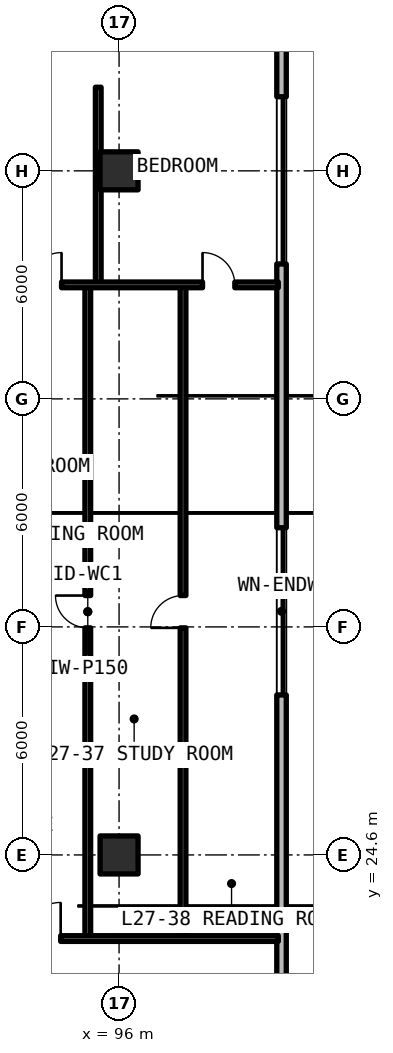
"""IFC4 building model, lengths in metres.
Left out: names, types, materials, properties, quantities, classifications, styles, units other than length and angle.
Written with IfcOpenShell. Run it as: python <this file> out.ifc"""

import sys

from ifc_helpers import new_model, si_unit, direction, frame, frame_2d, origin, origin_2d, place, context, subcontext, project, spatial, rectangle, extrude, element, fill, save


model = new_model("IFC4")
c1 = context("Model", 3, precision=1e-05, world=origin(), true_north=direction((0.0, 1.0)))
c2 = subcontext(c1, "Body", "Model", "MODEL_VIEW")
j1 = project(units=[si_unit("LENGTHUNIT", "METRE"), si_unit("PLANEANGLEUNIT", "RADIAN")], contexts=[c1])
p1 = place(None, origin())
s1 = spatial("IfcSite", under=j1, at=p1, CompositionType="ELEMENT")
p2 = place(p1, origin())
s2 = spatial("IfcBuilding", under=s1, at=p2, CompositionType="ELEMENT")
p3 = place(p2, frame((0.0, 0.0, 98.67)))
s3 = spatial("IfcBuildingStorey", under=s2, at=p3, CompositionType="ELEMENT", Elevation=98.67)
for number, where, z_axis, x_axis in (
    (1, (96.0, 24.6, 0.0), (0.0, 0.0, 1.0), (1.0, 0.0, 0.0)),
    (2, (96.0, 42.6, 0.0), (0.0, 0.0, 1.0), (1.0, 0.0, 0.0)),
):
    element("IfcColumn", number, at=place(p3, frame(where, z_axis=z_axis, x_axis=x_axis)), inside=s3, PredefinedType="COLUMN", context=c2, shape_type="SweptSolid", body=[
        extrude(rectangle(XDim=1.0, YDim=1.0, at=origin_2d()), origin(), (0.0, 0.0, 1.0), 3.3),
    ])
p4 = place(p3, frame((100.275, 13.852, 0.0), z_axis=(0.0, 0.0, 1.0), x_axis=(0.0, 1.0, 0.0)))
e3 = element("IfcWall", 3, at=p4, inside=s3, PredefinedType="SOLIDWALL", context=c2, shape_type="SweptSolid", body=[
    extrude(rectangle(XDim=39.496, YDim=0.25, at=frame_2d((19.748, 0.0))), origin(), (0.0, 0.0, 1.0), 3.08),
])
p5 = place(p4, frame((14.958, 0.0, 0.78)))
e4 = element("IfcOpeningElement", 4, at=p5, cuts=e3, PredefinedType="OPENING", context=c2, shape_type="SweptSolid", body=[
    extrude(rectangle(XDim=4.4, YDim=1.66, at=frame_2d((2.2, 0.83))), frame((0.0, 0.135, 0.0), z_axis=(0.0, -1.0, 0.0), x_axis=(1.0, 0.0, 0.0)), (0.0, 0.0, 1.0), 0.27),
])
p6 = place(p4, frame((26.298, 0.0, 0.78)))
e5 = element("IfcOpeningElement", 5, at=p6, cuts=e3, PredefinedType="OPENING", context=c2, shape_type="SweptSolid", body=[
    extrude(rectangle(XDim=4.4, YDim=1.66, at=frame_2d((2.2, 0.83))), frame((0.0, 0.135, 0.0), z_axis=(0.0, -1.0, 0.0), x_axis=(1.0, 0.0, 0.0)), (0.0, 0.0, 1.0), 0.27),
])
p7 = place(p4, frame((2.454, 0.0, 0.78)))
e6 = element("IfcOpeningElement", 6, at=p7, cuts=e3, PredefinedType="OPENING", context=c2, shape_type="SweptSolid", body=[
    extrude(rectangle(XDim=1.4, YDim=1.65, at=frame_2d((0.7, 0.825))), frame((0.0, 0.135, 0.0), z_axis=(0.0, -1.0, 0.0), x_axis=(1.0, 0.0, 0.0)), (0.0, 0.0, 1.0), 0.27),
])
p8 = place(p3, frame((95.177, 22.4, 0.0), z_axis=(0.0, 0.0, 1.0), x_axis=(0.0, 1.0, 0.0)))
e7 = element("IfcWall", 7, at=p8, inside=s3, PredefinedType="PARTITIONING", context=c2, shape_type="SweptSolid", body=[
    extrude(rectangle(XDim=17.2, YDim=0.15, at=frame_2d((8.6, 0.0))), origin(), (0.0, 0.0, 1.0), 2.35),
])
p9 = place(p8, frame((8.175, 0.0, 0.0)))
e8 = element("IfcOpeningElement", 8, at=p9, cuts=e7, PredefinedType="OPENING", context=c2, shape_type="SweptSolid", body=[
    extrude(rectangle(XDim=0.85, YDim=2.1, at=frame_2d((0.425, 1.05))), frame((0.0, 0.085, 0.0), z_axis=(0.0, -1.0, 0.0), x_axis=(1.0, 0.0, 0.0)), (0.0, 0.0, 1.0), 0.17),
])
p10 = place(p3, frame((97.683, 22.4, 0.0), z_axis=(0.0, 0.0, 1.0), x_axis=(0.0, 1.0, 0.0)))
e9 = element("IfcWall", 9, at=p10, inside=s3, PredefinedType="PARTITIONING", context=c2, shape_type="SweptSolid", body=[
    extrude(rectangle(XDim=17.2, YDim=0.15, at=frame_2d((8.6, 0.0))), origin(), (0.0, 0.0, 1.0), 2.35),
])
p11 = place(p10, frame((8.175, 0.0, 0.0)))
e10 = element("IfcOpeningElement", 10, at=p11, cuts=e9, PredefinedType="OPENING", context=c2, shape_type="SweptSolid", body=[
    extrude(rectangle(XDim=0.85, YDim=2.1, at=frame_2d((0.425, 1.05))), frame((0.0, 0.085, 0.0), z_axis=(0.0, -1.0, 0.0), x_axis=(1.0, 0.0, 0.0)), (0.0, 0.0, 1.0), 0.17),
])
p12 = place(p3, frame((95.452, 39.6, 0.0), z_axis=(0.0, 0.0, 1.0), x_axis=(0.0, 1.0, 0.0)))
e11 = element("IfcWall", 11, at=p12, inside=s3, PredefinedType="PARTITIONING", context=c2, shape_type="SweptSolid", body=[
    extrude(rectangle(XDim=5.2, YDim=0.15, at=frame_2d((2.6, 0.0))), origin(), (0.0, 0.0, 1.0), 2.35),
])
p13 = place(p3, frame((90.32, 39.6, 0.0), z_axis=(0.0, 0.0, 1.0), x_axis=(1.0, 0.0, 0.0)))
e12 = element("IfcWall", 12, at=p13, inside=s3, PredefinedType="PARTITIONING", context=c2, shape_type="SweptSolid", body=[
    extrude(rectangle(XDim=9.87, YDim=0.15, at=frame_2d((4.935, 0.0))), origin(), (0.0, 0.0, 1.0), 2.35),
])
p14 = place(p13, frame((3.316, 0.0, 0.0)))
e13 = element("IfcOpeningElement", 13, at=p14, cuts=e12, PredefinedType="OPENING", context=c2, shape_type="SweptSolid", body=[
    extrude(rectangle(XDim=0.85, YDim=2.1, at=frame_2d((0.425, 1.05))), frame((0.0, 0.085, 0.0), z_axis=(0.0, -1.0, 0.0), x_axis=(1.0, 0.0, 0.0)), (0.0, 0.0, 1.0), 0.17),
])
p15 = place(p13, frame((7.876, 0.0, 0.0)))
e14 = element("IfcOpeningElement", 14, at=p15, cuts=e12, PredefinedType="OPENING", context=c2, shape_type="SweptSolid", body=[
    extrude(rectangle(XDim=0.85, YDim=2.1, at=frame_2d((0.425, 1.05))), frame((0.0, 0.085, 0.0), z_axis=(0.0, -1.0, 0.0), x_axis=(1.0, 0.0, 0.0)), (0.0, 0.0, 1.0), 0.17),
])
p16 = place(p3, frame((90.32, 22.4, 0.0), z_axis=(0.0, 0.0, 1.0), x_axis=(1.0, 0.0, 0.0)))
e15 = element("IfcWall", 15, at=p16, inside=s3, PredefinedType="SOLIDWALL", context=c2, shape_type="SweptSolid", body=[
    extrude(rectangle(XDim=9.87, YDim=0.15, at=frame_2d((4.935, 0.0))), origin(), (0.0, 0.0, 1.0), 2.35),
])
p17 = place(p16, frame((3.193, 0.0, 0.0)))
e16 = element("IfcOpeningElement", 16, at=p17, cuts=e15, PredefinedType="OPENING", context=c2, shape_type="SweptSolid", body=[
    extrude(rectangle(XDim=0.95, YDim=2.15, at=frame_2d((0.475, 1.075))), frame((0.0, 0.085, 0.0), z_axis=(0.0, -1.0, 0.0), x_axis=(1.0, 0.0, 0.0)), (0.0, 0.0, 1.0), 0.17),
])
p18 = place(p5, origin())
e17 = element("IfcWindow", 17, at=p18, inside=s3, PartitioningType="SINGLE_PANEL", PredefinedType="WINDOW", context=c2, shape_type="SweptSolid", body=[
    extrude(rectangle(XDim=4.4, YDim=1.66, at=frame_2d((2.2, 0.83))), frame((0.0, 0.03, 0.0), z_axis=(0.0, -1.0, 0.0), x_axis=(1.0, 0.0, 0.0)), (0.0, 0.0, 1.0), 0.06),
])
fill(e4, e17)
p19 = place(p6, origin())
e18 = element("IfcWindow", 18, at=p19, inside=s3, PartitioningType="SINGLE_PANEL", PredefinedType="WINDOW", context=c2, shape_type="SweptSolid", body=[
    extrude(rectangle(XDim=4.4, YDim=1.66, at=frame_2d((2.2, 0.83))), frame((0.0, 0.03, 0.0), z_axis=(0.0, -1.0, 0.0), x_axis=(1.0, 0.0, 0.0)), (0.0, 0.0, 1.0), 0.06),
])
fill(e5, e18)
p20 = place(p9, origin())
e19 = element("IfcDoor", 19, at=p20, inside=s3, OperationType="SINGLE_SWING_RIGHT", PredefinedType="DOOR", context=c2, shape_type="SweptSolid", body=[
    extrude(rectangle(XDim=0.85, YDim=2.1, at=frame_2d((0.425, 1.05))), frame((0.0, 0.025, 0.0), z_axis=(0.0, -1.0, 0.0), x_axis=(1.0, 0.0, 0.0)), (0.0, 0.0, 1.0), 0.05),
])
fill(e8, e19)
p21 = place(p11, origin())
e20 = element("IfcDoor", 20, at=p21, inside=s3, OperationType="SINGLE_SWING_LEFT", PredefinedType="DOOR", context=c2, shape_type="SweptSolid", body=[
    extrude(rectangle(XDim=0.85, YDim=2.1, at=frame_2d((0.425, 1.05))), frame((0.0, 0.025, 0.0), z_axis=(0.0, -1.0, 0.0), x_axis=(1.0, 0.0, 0.0)), (0.0, 0.0, 1.0), 0.05),
])
fill(e10, e20)
p22 = place(p14, origin())
e21 = element("IfcDoor", 21, at=p22, inside=s3, OperationType="SINGLE_SWING_RIGHT", PredefinedType="DOOR", context=c2, shape_type="SweptSolid", body=[
    extrude(rectangle(XDim=0.85, YDim=2.1, at=frame_2d((0.425, 1.05))), frame((0.0, 0.025, 0.0), z_axis=(0.0, -1.0, 0.0), x_axis=(1.0, 0.0, 0.0)), (0.0, 0.0, 1.0), 0.05),
])
fill(e13, e21)
p23 = place(p15, origin())
e22 = element("IfcDoor", 22, at=p23, inside=s3, OperationType="SINGLE_SWING_LEFT", PredefinedType="DOOR", context=c2, shape_type="SweptSolid", body=[
    extrude(rectangle(XDim=0.85, YDim=2.1, at=frame_2d((0.425, 1.05))), frame((0.0, 0.025, 0.0), z_axis=(0.0, -1.0, 0.0), x_axis=(1.0, 0.0, 0.0)), (0.0, 0.0, 1.0), 0.05),
])
fill(e14, e22)
p24 = place(p17, origin())
e23 = element("IfcDoor", 23, at=p24, inside=s3, OperationType="SINGLE_SWING_RIGHT", PredefinedType="DOOR", context=c2, shape_type="SweptSolid", body=[
    extrude(rectangle(XDim=0.95, YDim=2.15, at=frame_2d((0.475, 1.075))), frame((0.0, 0.025, 0.0), z_axis=(0.0, -1.0, 0.0), x_axis=(1.0, 0.0, 0.0)), (0.0, 0.0, 1.0), 0.05),
])
fill(e16, e23)
save(model, sys.argv[1])
